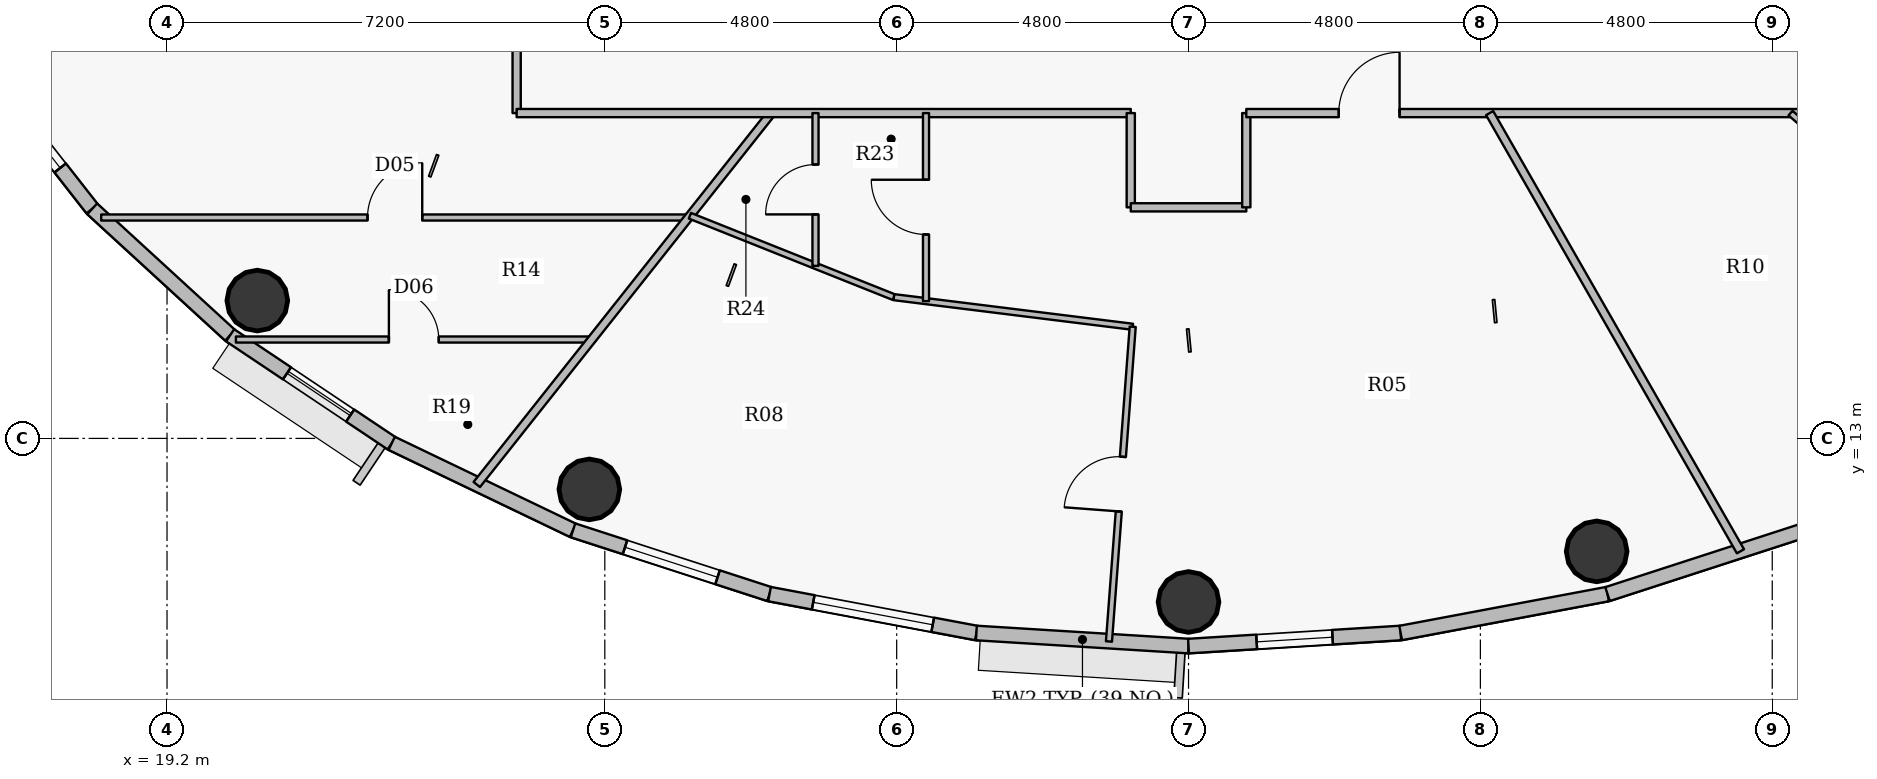
"""IFC4 building model, lengths in metres.
Left out: names, types, materials, properties, quantities, classifications, styles, units other than length and angle.
Written with IfcOpenShell. Run it as: python <this file> out.ifc"""

import sys

from ifc_helpers import new_model, si_unit, direction, frame, frame_2d, origin, origin_2d, place, context, subcontext, project, spatial, rectangle, hollow_circle, extrude, source, transform, mapped, element, fill, save


model = new_model("IFC4")
c1 = context("Model", 3, precision=1e-05, world=origin(), true_north=direction((0.0, 1.0)))
c2 = subcontext(c1, "Body", "Model", "MODEL_VIEW")
j1 = project(units=[si_unit("LENGTHUNIT", "METRE"), si_unit("PLANEANGLEUNIT", "RADIAN")], contexts=[c1])
p1 = place(None, origin())
s1 = spatial("IfcSite", under=j1, at=p1, CompositionType="ELEMENT")
p2 = place(p1, origin())
s2 = spatial("IfcBuilding", under=s1, at=p2, CompositionType="ELEMENT")
p3 = place(p2, frame((0.0, 0.0, 273.0)))
s3 = spatial("IfcBuildingStorey", under=s2, at=p3, CompositionType="ELEMENT", Elevation=273.0)
for number, where, z_axis, x_axis in (
    (1, (20.685, 15.267, 0.0), (0.0, 0.0, 1.0), (1.0, 0.0, 0.0)),
    (2, (26.146, 12.161, 0.0), (0.0, 0.0, 1.0), (1.0, 0.0, 0.0)),
    (3, (36.0, 10.31, 0.0), (0.0, 0.0, 1.0), (1.0, 0.0, 0.0)),
    (4, (42.712, 11.142, 0.0), (0.0, 0.0, 1.0), (1.0, 0.0, 0.0)),
):
    element("IfcColumn", number, at=place(p3, frame(where, z_axis=z_axis, x_axis=x_axis)), inside=s3, PredefinedType="COLUMN", context=c2, shape_type="SweptSolid", body=[
        extrude(hollow_circle(Radius=0.5, WallThickness=0.032, at=origin_2d()), origin(), (0.0, 0.0, 1.0), 3.75),
    ])
p4 = place(p3, frame((17.97, 16.775, 0.0), z_axis=(0.0, 0.0, 1.0), x_axis=(-0.616337186556, 0.787482363275, 0.0)))
e5 = element("IfcWall", 5, at=p4, inside=s3, PredefinedType="SOLIDWALL", context=c2, shape_type="SweptSolid", body=[
    extrude(rectangle(XDim=2.958, YDim=0.24, at=frame_2d((1.479, 0.0))), origin(), (0.0, 0.0, 1.0), 3.5),
])
p5 = place(p4, frame((0.854, 0.0, 0.9)))
e6 = element("IfcOpeningElement", 6, at=p5, cuts=e5, PredefinedType="OPENING", context=c2, shape_type="SweptSolid", body=[
    extrude(rectangle(XDim=1.25, YDim=1.65, at=origin_2d()), frame((0.625, 0.13, 0.825), z_axis=(0.0, -1.0, 0.0), x_axis=(1.0, 0.0, 0.0)), (0.0, 0.0, 1.0), 0.26),
])
p6 = place(p3, frame((20.238, 14.696, 0.0), z_axis=(0.0, 0.0, 1.0), x_axis=(-0.737068506972, 0.675818034703, 0.0)))
e7 = element("IfcWall", 7, at=p6, inside=s3, PredefinedType="SOLIDWALL", context=c2, shape_type="SweptSolid", body=[
    extrude(rectangle(XDim=3.077, YDim=0.24, at=frame_2d((1.539, 0.0))), origin(), (0.0, 0.0, 1.0), 3.5),
])
p7 = place(p3, frame((22.896, 12.918, 0.0), z_axis=(0.0, 0.0, 1.0), x_axis=(-0.831250592635, 0.55589787933, 0.0)))
e8 = element("IfcWall", 8, at=p7, inside=s3, PredefinedType="SOLIDWALL", context=c2, shape_type="SweptSolid", body=[
    extrude(rectangle(XDim=3.197, YDim=0.24, at=frame_2d((1.599, 0.0))), origin(), (0.0, 0.0, 1.0), 3.5),
])
p8 = place(p7, frame((0.822, 0.0, 0.9)))
e9 = element("IfcOpeningElement", 9, at=p8, cuts=e8, PredefinedType="OPENING", context=c2, shape_type="SweptSolid", body=[
    extrude(rectangle(XDim=1.25, YDim=1.65, at=origin_2d()), frame((0.625, 0.13, 0.825), z_axis=(0.0, -1.0, 0.0), x_axis=(1.0, 0.0, 0.0)), (0.0, 0.0, 1.0), 0.26),
])
p9 = place(p3, frame((25.877, 11.488, 0.0), z_axis=(0.0, 0.0, 1.0), x_axis=(-0.901573741254, 0.43262546051, 0.0)))
e10 = element("IfcWall", 10, at=p9, inside=s3, PredefinedType="SOLIDWALL", context=c2, shape_type="SweptSolid", body=[
    extrude(rectangle(XDim=3.307, YDim=0.24, at=frame_2d((1.653, 0.0))), origin(), (0.0, 0.0, 1.0), 3.5),
])
p10 = place(p3, frame((29.109, 10.44, 0.0), z_axis=(0.0, 0.0, 1.0), x_axis=(-0.95123136723, 0.308478339592, 0.0)))
e11 = element("IfcWall", 11, at=p10, inside=s3, PredefinedType="SOLIDWALL", context=c2, shape_type="SweptSolid", body=[
    extrude(rectangle(XDim=3.398, YDim=0.24, at=frame_2d((1.699, 0.0))), origin(), (0.0, 0.0, 1.0), 3.5),
])
p11 = place(p10, frame((0.899, 0.0, 0.9)))
e12 = element("IfcOpeningElement", 12, at=p11, cuts=e11, PredefinedType="OPENING", context=c2, shape_type="SweptSolid", body=[
    extrude(rectangle(XDim=1.6, YDim=1.75, at=origin_2d()), frame((0.8, 0.13, 0.875), z_axis=(0.0, -1.0, 0.0), x_axis=(1.0, 0.0, 0.0)), (0.0, 0.0, 1.0), 0.26),
])
p12 = place(p3, frame((32.511, 9.8, 0.0), z_axis=(0.0, 0.0, 1.0), x_axis=(-0.982782655757, 0.184765395959, 0.0)))
e13 = element("IfcWall", 13, at=p12, inside=s3, PredefinedType="SOLIDWALL", context=c2, shape_type="SweptSolid", body=[
    extrude(rectangle(XDim=3.462, YDim=0.24, at=frame_2d((1.731, 0.0))), origin(), (0.0, 0.0, 1.0), 3.5),
])
p13 = place(p12, frame((0.731, 0.0, 0.9)))
e14 = element("IfcOpeningElement", 14, at=p13, cuts=e13, PredefinedType="OPENING", context=c2, shape_type="SweptSolid", body=[
    extrude(rectangle(XDim=2.0, YDim=1.75, at=origin_2d()), frame((1.0, 0.13, 0.875), z_axis=(0.0, -1.0, 0.0), x_axis=(1.0, 0.0, 0.0)), (0.0, 0.0, 1.0), 0.26),
])
p14 = place(p3, frame((36.0, 9.585, 0.0), z_axis=(0.0, 0.0, 1.0), x_axis=(-0.998104946479, 0.061534671648, 0.0)))
e15 = element("IfcWall", 15, at=p14, inside=s3, PredefinedType="SOLIDWALL", context=c2, shape_type="SweptSolid", body=[
    extrude(rectangle(XDim=3.495, YDim=0.24, at=frame_2d((1.748, 0.0))), origin(), (0.0, 0.0, 1.0), 3.5),
])
p15 = place(p3, frame((39.489, 9.8, 0.0), z_axis=(0.0, 0.0, 1.0), x_axis=(-0.998104946479, -0.061534671648, 0.0)))
e16 = element("IfcWall", 16, at=p15, inside=s3, PredefinedType="SOLIDWALL", context=c2, shape_type="SweptSolid", body=[
    extrude(rectangle(XDim=3.495, YDim=0.24, at=frame_2d((1.748, 0.0))), origin(), (0.0, 0.0, 1.0), 3.5),
])
p16 = place(p15, frame((1.123, 0.0, 0.9)))
e17 = element("IfcOpeningElement", 17, at=p16, cuts=e16, PredefinedType="OPENING", context=c2, shape_type="SweptSolid", body=[
    extrude(rectangle(XDim=1.25, YDim=1.65, at=origin_2d()), frame((0.625, 0.13, 0.825), z_axis=(0.0, -1.0, 0.0), x_axis=(1.0, 0.0, 0.0)), (0.0, 0.0, 1.0), 0.26),
])
p17 = place(p3, frame((42.891, 10.44, 0.0), z_axis=(0.0, 0.0, 1.0), x_axis=(-0.982782655757, -0.184765395959, 0.0)))
e18 = element("IfcWall", 18, at=p17, inside=s3, PredefinedType="SOLIDWALL", context=c2, shape_type="SweptSolid", body=[
    extrude(rectangle(XDim=3.462, YDim=0.24, at=frame_2d((1.731, 0.0))), origin(), (0.0, 0.0, 1.0), 3.5),
])
p18 = place(p3, frame((46.123, 11.488, 0.0), z_axis=(0.0, 0.0, 1.0), x_axis=(-0.95123136723, -0.308478339592, 0.0)))
e19 = element("IfcWall", 19, at=p18, inside=s3, PredefinedType="SOLIDWALL", context=c2, shape_type="SweptSolid", body=[
    extrude(rectangle(XDim=3.398, YDim=0.24, at=frame_2d((1.699, 0.0))), origin(), (0.0, 0.0, 1.0), 3.5),
])
p19 = place(p3, frame((18.118, 16.633, 0.0), z_axis=(0.0, 0.0, 1.0), x_axis=(1.0, 0.0, 0.0)))
e20 = element("IfcWall", 20, at=p19, inside=s3, PredefinedType="PARTITIONING", context=c2, shape_type="SweptSolid", body=[
    extrude(rectangle(XDim=9.659, YDim=0.1, at=frame_2d((4.83, 0.0))), origin(), (0.0, 0.0, 1.0), 2.985),
])
p20 = place(p19, frame((4.379, 0.0, 0.0)))
e21 = element("IfcOpeningElement", 21, at=p20, cuts=e20, PredefinedType="OPENING", context=c2, shape_type="SweptSolid", body=[
    extrude(rectangle(XDim=0.9, YDim=2.1, at=origin_2d()), frame((0.45, 0.06, 1.05), z_axis=(0.0, -1.0, 0.0), x_axis=(1.0, 0.0, 0.0)), (0.0, 0.0, 1.0), 0.12),
])
p21 = place(p3, frame((20.333, 14.626, 0.0), z_axis=(0.0, 0.0, 1.0), x_axis=(1.0, 0.0, 0.0)))
e22 = element("IfcWall", 22, at=p21, inside=s3, PredefinedType="PARTITIONING", context=c2, shape_type="SweptSolid", body=[
    extrude(rectangle(XDim=5.852, YDim=0.1, at=frame_2d((2.926, 0.0))), origin(), (0.0, 0.0, 1.0), 2.985),
])
p22 = place(p21, frame((2.516, 0.0, 0.0)))
e23 = element("IfcOpeningElement", 23, at=p22, cuts=e22, PredefinedType="OPENING", context=c2, shape_type="SweptSolid", body=[
    extrude(rectangle(XDim=0.82, YDim=2.1, at=origin_2d()), frame((0.41, 0.06, 1.05), z_axis=(0.0, -1.0, 0.0), x_axis=(1.0, 0.0, 0.0)), (0.0, 0.0, 1.0), 0.12),
])
p23 = place(p3, frame((24.294, 12.242, 0.0), z_axis=(0.0, 0.0, 1.0), x_axis=(0.621439784824, 0.783461928774, 0.0)))
e24 = element("IfcWall", 24, at=p23, inside=s3, PredefinedType="PARTITIONING", context=c2, shape_type="SweptSolid", body=[
    extrude(rectangle(XDim=7.796, YDim=0.135, at=frame_2d((3.898, 0.0))), origin(), (0.0, 0.0, 1.0), 2.985),
])
p24 = place(p3, frame((24.95, 18.35, 0.0), z_axis=(0.0, 0.0, 1.0), x_axis=(0.0, 1.0, 0.0)))
e25 = element("IfcWall", 25, at=p24, inside=s3, PredefinedType="PARTITIONING", context=c2, shape_type="SweptSolid", body=[
    extrude(rectangle(XDim=17.3, YDim=0.135, at=frame_2d((8.65, 0.0))), origin(), (0.0, 0.0, 1.0), 3.035),
])
p25 = place(p24, frame((5.495, 0.0, 0.0)))
e26 = element("IfcOpeningElement", 26, at=p25, cuts=e25, PredefinedType="OPENING", context=c2, shape_type="SweptSolid", body=[
    extrude(rectangle(XDim=1.0, YDim=2.15, at=origin_2d()), frame((0.5, 0.078, 1.075), z_axis=(0.0, -1.0, 0.0), x_axis=(1.0, 0.0, 0.0)), (0.0, 0.0, 1.0), 0.155),
])
p26 = place(p3, frame((24.95, 18.35, 0.0), z_axis=(0.0, 0.0, 1.0), x_axis=(1.0, 0.0, 0.0)))
e27 = element("IfcWall", 27, at=p26, inside=s3, PredefinedType="PARTITIONING", context=c2, shape_type="SweptSolid", body=[
    extrude(rectangle(XDim=10.1, YDim=0.135, at=frame_2d((5.05, 0.0))), origin(), (0.0, 0.0, 1.0), 3.035),
])
p27 = place(p3, frame((27.8, 16.662, 0.0), z_axis=(0.0, 0.0, 1.0), x_axis=(0.928783988526, -0.370621508628, 0.0)))
e28 = element("IfcWall", 28, at=p27, inside=s3, PredefinedType="PARTITIONING", context=c2, shape_type="SweptSolid", body=[
    extrude(rectangle(XDim=3.613, YDim=0.1, at=frame_2d((1.806, 0.0))), origin(), (0.0, 0.0, 1.0), 3.035),
])
p28 = place(p3, frame((29.865, 15.837, 0.0), z_axis=(0.0, 0.0, 1.0), x_axis=(0.0, 1.0, 0.0)))
e29 = element("IfcWall", 29, at=p28, inside=s3, PredefinedType="PARTITIONING", context=c2, shape_type="SweptSolid", body=[
    extrude(rectangle(XDim=2.513, YDim=0.1, at=frame_2d((1.256, 0.0))), origin(), (0.0, 0.0, 1.0), 3.035),
])
p29 = place(p28, frame((0.846, 0.0, 0.0)))
e30 = element("IfcOpeningElement", 30, at=p29, cuts=e29, PredefinedType="OPENING", context=c2, shape_type="SweptSolid", body=[
    extrude(rectangle(XDim=0.82, YDim=2.1, at=origin_2d()), frame((0.41, 0.06, 1.05), z_axis=(0.0, -1.0, 0.0), x_axis=(1.0, 0.0, 0.0)), (0.0, 0.0, 1.0), 0.12),
])
p30 = place(p3, frame((31.155, 15.323, 0.0), z_axis=(0.0, 0.0, 1.0), x_axis=(0.992397939869, -0.123070422704, 0.0)))
e31 = element("IfcWall", 31, at=p30, inside=s3, PredefinedType="PARTITIONING", context=c2, shape_type="SweptSolid", body=[
    extrude(rectangle(XDim=3.958, YDim=0.1, at=frame_2d((1.979, 0.0))), origin(), (0.0, 0.0, 1.0), 3.5),
])
p31 = place(p3, frame((31.683, 15.258, 0.0), z_axis=(0.0, 0.0, 1.0), x_axis=(0.0, 1.0, 0.0)))
e32 = element("IfcWall", 32, at=p31, inside=s3, PredefinedType="PARTITIONING", context=c2, shape_type="SweptSolid", body=[
    extrude(rectangle(XDim=3.093, YDim=0.1, at=frame_2d((1.546, 0.0))), origin(), (0.0, 0.0, 1.0), 3.5),
])
p32 = place(p31, frame((1.096, 0.0, 0.0)))
e33 = element("IfcOpeningElement", 33, at=p32, cuts=e32, PredefinedType="OPENING", context=c2, shape_type="SweptSolid", body=[
    extrude(rectangle(XDim=0.9, YDim=2.1, at=origin_2d()), frame((0.45, 0.06, 1.05), z_axis=(0.0, -1.0, 0.0), x_axis=(1.0, 0.0, 0.0)), (0.0, 0.0, 1.0), 0.12),
])
p33 = place(p3, frame((34.691, 9.661, 0.0), z_axis=(0.0, 0.0, 1.0), x_axis=(0.0752647297, 0.997163587614, 0.0)))
e34 = element("IfcWall", 34, at=p33, inside=s3, PredefinedType="PARTITIONING", context=c2, shape_type="SweptSolid", body=[
    extrude(rectangle(XDim=5.19, YDim=0.1, at=frame_2d((2.595, 0.0))), origin(), (0.0, 0.0, 1.0), 2.985),
])
p34 = place(p33, frame((2.145, 0.0, 0.0)))
e35 = element("IfcOpeningElement", 35, at=p34, cuts=e34, PredefinedType="OPENING", context=c2, shape_type="SweptSolid", body=[
    extrude(rectangle(XDim=0.9, YDim=2.1, at=origin_2d()), frame((0.45, 0.06, 1.05), z_axis=(0.0, -1.0, 0.0), x_axis=(1.0, 0.0, 0.0)), (0.0, 0.0, 1.0), 0.12),
])
p35 = place(p3, frame((35.05, 16.8, 0.0), z_axis=(0.0, 0.0, 1.0), x_axis=(0.0, 1.0, 0.0)))
e36 = element("IfcWall", 36, at=p35, inside=s3, PredefinedType="PARTITIONING", context=c2, shape_type="SweptSolid", body=[
    extrude(rectangle(XDim=1.55, YDim=0.135, at=frame_2d((0.775, 0.0))), origin(), (0.0, 0.0, 1.0), 3.5),
])
p36 = place(p3, frame((35.05, 16.8, 0.0), z_axis=(0.0, 0.0, 1.0), x_axis=(1.0, 0.0, 0.0)))
e37 = element("IfcWall", 37, at=p36, inside=s3, PredefinedType="PARTITIONING", context=c2, shape_type="SweptSolid", body=[
    extrude(rectangle(XDim=1.9, YDim=0.135, at=frame_2d((0.95, 0.0))), origin(), (0.0, 0.0, 1.0), 3.035),
])
p37 = place(p3, frame((36.95, 16.8, 0.0), z_axis=(0.0, 0.0, 1.0), x_axis=(0.0, 1.0, 0.0)))
e38 = element("IfcWall", 38, at=p37, inside=s3, PredefinedType="PARTITIONING", context=c2, shape_type="SweptSolid", body=[
    extrude(rectangle(XDim=1.55, YDim=0.135, at=frame_2d((0.775, 0.0))), origin(), (0.0, 0.0, 1.0), 3.5),
])
p38 = place(p3, frame((36.95, 18.35, 0.0), z_axis=(0.0, 0.0, 1.0), x_axis=(1.0, 0.0, 0.0)))
e39 = element("IfcWall", 39, at=p38, inside=s3, PredefinedType="PARTITIONING", context=c2, shape_type="SweptSolid", body=[
    extrude(rectangle(XDim=10.1, YDim=0.135, at=frame_2d((5.05, 0.0))), origin(), (0.0, 0.0, 1.0), 3.035),
])
p39 = place(p38, frame((1.521, 0.0, 0.0)))
e40 = element("IfcOpeningElement", 40, at=p39, cuts=e39, PredefinedType="OPENING", context=c2, shape_type="SweptSolid", body=[
    extrude(rectangle(XDim=1.0, YDim=2.15, at=origin_2d()), frame((0.5, 0.078, 1.075), z_axis=(0.0, -1.0, 0.0), x_axis=(1.0, 0.0, 0.0)), (0.0, 0.0, 1.0), 0.155),
])
p40 = place(p3, frame((40.952, 18.35, 0.0), z_axis=(0.0, 0.0, 1.0), x_axis=(0.496803688517, -0.867862947173, 0.0)))
e41 = element("IfcWall", 41, at=p40, inside=s3, PredefinedType="PARTITIONING", context=c2, shape_type="SweptSolid", body=[
    extrude(rectangle(XDim=8.304, YDim=0.135, at=frame_2d((4.152, 0.0))), origin(), (0.0, 0.0, 1.0), 2.985),
])
p41 = place(p3, frame((45.901, 18.35, 0.0), z_axis=(0.0, 0.0, 1.0), x_axis=(0.753056223084, -0.657956172457, 0.0)))
e42 = element("IfcWall", 42, at=p41, inside=s3, PredefinedType="PARTITIONING", context=c2, shape_type="SweptSolid", body=[
    extrude(rectangle(XDim=6.526, YDim=0.1, at=frame_2d((3.263, 0.0))), origin(), (0.0, 0.0, 1.0), 2.985),
])
p42 = place(p41, frame((2.813, 0.0, 0.0)))
e43 = element("IfcOpeningElement", 43, at=p42, cuts=e42, PredefinedType="OPENING", context=c2, shape_type="SweptSolid", body=[
    extrude(rectangle(XDim=0.9, YDim=2.1, at=origin_2d()), frame((0.45, 0.06, 1.05), z_axis=(0.0, -1.0, 0.0), x_axis=(1.0, 0.0, 0.0)), (0.0, 0.0, 1.0), 0.12),
])
m1 = source(origin(), c2, "Body", "SweptSolid", [
    extrude(rectangle(XDim=1.25, YDim=1.65, at=origin_2d()), frame((0.625, 0.03, 0.825), z_axis=(0.0, -1.0, 0.0), x_axis=(1.0, 0.0, 0.0)), (0.0, 0.0, 1.0), 0.06),
])
p43 = place(p5, origin())
e44 = element("IfcWindow", 44, at=p43, inside=s3, PartitioningType="SINGLE_PANEL", PredefinedType="WINDOW", context=c2, shape_type="MappedRepresentation", body=[
    mapped(m1, transform((0.0, 0.0, 0.0), x_axis=(1.0, 0.0, 0.0), y_axis=(0.0, 1.0, 0.0), z_axis=(0.0, 0.0, 1.0), scale=1.0)),
])
fill(e6, e44)
p44 = place(p8, origin())
e45 = element("IfcWindow", 45, at=p44, inside=s3, PartitioningType="SINGLE_PANEL", PredefinedType="WINDOW", context=c2, shape_type="MappedRepresentation", body=[
    mapped(m1, transform((0.0, 0.0, 0.0), x_axis=(1.0, 0.0, 0.0), y_axis=(0.0, 1.0, 0.0), z_axis=(0.0, 0.0, 1.0), scale=1.0)),
])
fill(e9, e45)
m2 = source(origin(), c2, "Body", "SweptSolid", [
    extrude(rectangle(XDim=1.6, YDim=1.75, at=origin_2d()), frame((0.8, 0.03, 0.875), z_axis=(0.0, -1.0, 0.0), x_axis=(1.0, 0.0, 0.0)), (0.0, 0.0, 1.0), 0.06),
])
p45 = place(p11, origin())
e46 = element("IfcWindow", 46, at=p45, inside=s3, PartitioningType="DOUBLE_PANEL_VERTICAL", PredefinedType="WINDOW", context=c2, shape_type="MappedRepresentation", body=[
    mapped(m2, transform((0.0, 0.0, 0.0), x_axis=(1.0, 0.0, 0.0), y_axis=(0.0, 1.0, 0.0), z_axis=(0.0, 0.0, 1.0), scale=1.0)),
])
fill(e12, e46)
m3 = source(origin(), c2, "Body", "SweptSolid", [
    extrude(rectangle(XDim=2.0, YDim=1.75, at=origin_2d()), frame((1.0, 0.03, 0.875), z_axis=(0.0, -1.0, 0.0), x_axis=(1.0, 0.0, 0.0)), (0.0, 0.0, 1.0), 0.06),
])
p46 = place(p13, origin())
e47 = element("IfcWindow", 47, at=p46, inside=s3, PartitioningType="DOUBLE_PANEL_VERTICAL", PredefinedType="WINDOW", context=c2, shape_type="MappedRepresentation", body=[
    mapped(m3, transform((0.0, 0.0, 0.0), x_axis=(1.0, 0.0, 0.0), y_axis=(0.0, 1.0, 0.0), z_axis=(0.0, 0.0, 1.0), scale=1.0)),
])
fill(e14, e47)
p47 = place(p16, origin())
e48 = element("IfcWindow", 48, at=p47, inside=s3, PartitioningType="SINGLE_PANEL", PredefinedType="WINDOW", context=c2, shape_type="MappedRepresentation", body=[
    mapped(m1, transform((0.0, 0.0, 0.0), x_axis=(1.0, 0.0, 0.0), y_axis=(0.0, 1.0, 0.0), z_axis=(0.0, 0.0, 1.0), scale=1.0)),
])
fill(e17, e48)
m4 = source(origin(), c2, "Body", "SweptSolid", [
    extrude(rectangle(XDim=0.9, YDim=2.1, at=origin_2d()), frame((0.45, 0.025, 1.05), z_axis=(0.0, -1.0, 0.0), x_axis=(1.0, 0.0, 0.0)), (0.0, 0.0, 1.0), 0.05),
])
p48 = place(p20, origin())
e49 = element("IfcDoor", 49, at=p48, inside=s3, OperationType="SINGLE_SWING_RIGHT", PredefinedType="DOOR", context=c2, shape_type="MappedRepresentation", body=[
    mapped(m4, transform((0.0, 0.0, 0.0), x_axis=(1.0, 0.0, 0.0), y_axis=(0.0, 1.0, 0.0), z_axis=(0.0, 0.0, 1.0), scale=1.0)),
])
fill(e21, e49)
m5 = source(origin(), c2, "Body", "SweptSolid", [
    extrude(rectangle(XDim=0.82, YDim=2.1, at=origin_2d()), frame((0.41, 0.025, 1.05), z_axis=(0.0, -1.0, 0.0), x_axis=(1.0, 0.0, 0.0)), (0.0, 0.0, 1.0), 0.05),
])
p49 = place(p22, origin())
e50 = element("IfcDoor", 50, at=p49, inside=s3, OperationType="SINGLE_SWING_LEFT", PredefinedType="DOOR", context=c2, shape_type="MappedRepresentation", body=[
    mapped(m5, transform((0.0, 0.0, 0.0), x_axis=(1.0, 0.0, 0.0), y_axis=(0.0, 1.0, 0.0), z_axis=(0.0, 0.0, 1.0), scale=1.0)),
])
fill(e23, e50)
m6 = source(origin(), c2, "Body", "SweptSolid", [
    extrude(rectangle(XDim=1.0, YDim=2.15, at=origin_2d()), frame((0.5, 0.025, 1.075), z_axis=(0.0, -1.0, 0.0), x_axis=(1.0, 0.0, 0.0)), (0.0, 0.0, 1.0), 0.05),
])
p50 = place(p39, origin())
e51 = element("IfcDoor", 51, at=p50, inside=s3, OperationType="SINGLE_SWING_RIGHT", PredefinedType="DOOR", context=c2, shape_type="MappedRepresentation", body=[
    mapped(m6, transform((0.0, 0.0, 0.0), x_axis=(1.0, 0.0, 0.0), y_axis=(0.0, 1.0, 0.0), z_axis=(0.0, 0.0, 1.0), scale=1.0)),
])
fill(e40, e51)
p51 = place(p34, origin())
e52 = element("IfcDoor", 52, at=p51, inside=s3, OperationType="SINGLE_SWING_LEFT", PredefinedType="DOOR", context=c2, shape_type="MappedRepresentation", body=[
    mapped(m4, transform((0.0, 0.0, 0.0), x_axis=(1.0, 0.0, 0.0), y_axis=(0.0, 1.0, 0.0), z_axis=(0.0, 0.0, 1.0), scale=1.0)),
])
fill(e35, e52)
p52 = place(p32, origin())
e53 = element("IfcDoor", 53, at=p52, inside=s3, OperationType="SINGLE_SWING_RIGHT", PredefinedType="DOOR", context=c2, shape_type="MappedRepresentation", body=[
    mapped(m4, transform((0.0, 0.0, 0.0), x_axis=(1.0, 0.0, 0.0), y_axis=(0.0, 1.0, 0.0), z_axis=(0.0, 0.0, 1.0), scale=1.0)),
])
fill(e33, e53)
p53 = place(p29, origin())
e54 = element("IfcDoor", 54, at=p53, inside=s3, OperationType="SINGLE_SWING_LEFT", PredefinedType="DOOR", context=c2, shape_type="MappedRepresentation", body=[
    mapped(m5, transform((0.0, 0.0, 0.0), x_axis=(1.0, 0.0, 0.0), y_axis=(0.0, 1.0, 0.0), z_axis=(0.0, 0.0, 1.0), scale=1.0)),
])
fill(e30, e54)
save(model, sys.argv[1])
